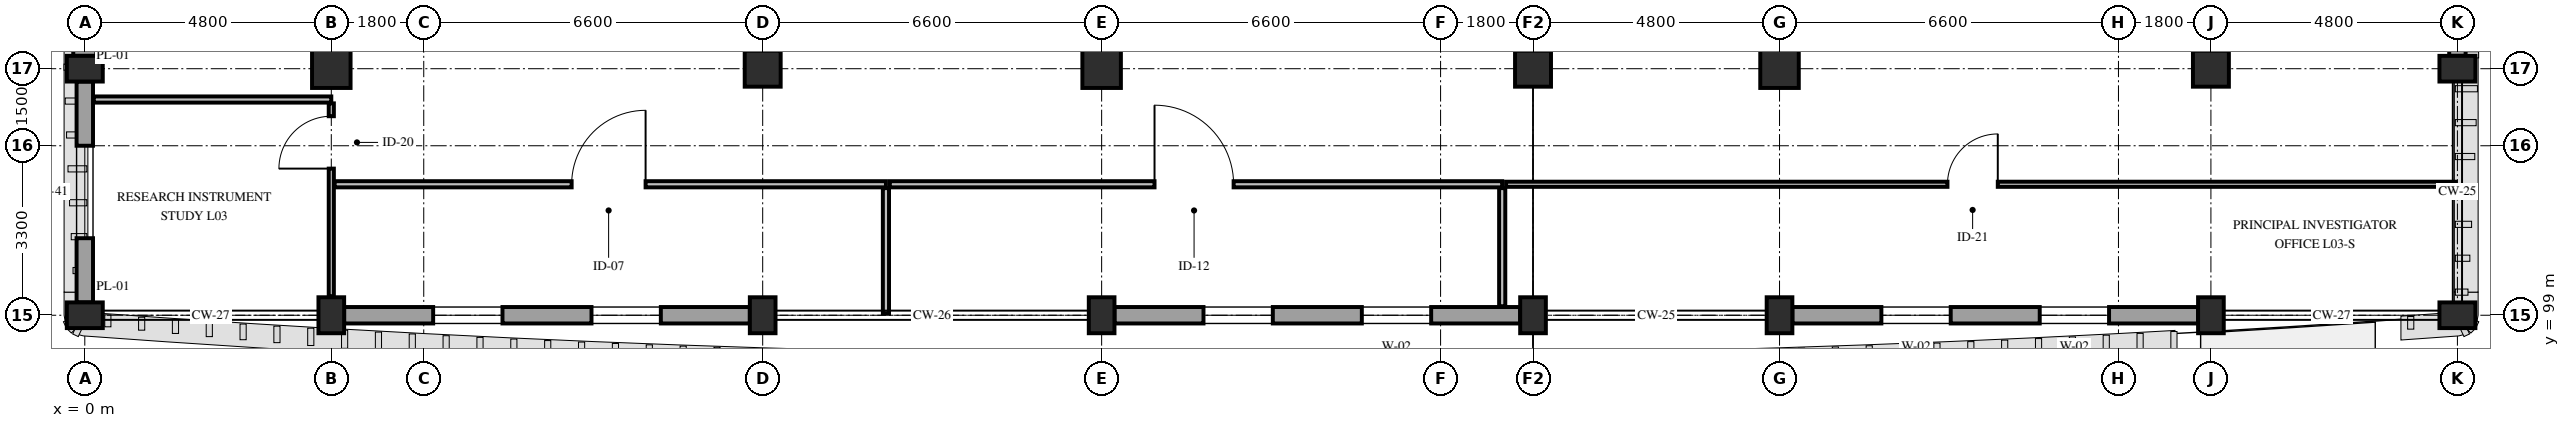
"""IFC4 building model, lengths in metres.
Left out: names, types, materials, properties, quantities, classifications, styles, units other than length and angle.
Written with IfcOpenShell. Run it as: python <this file> out.ifc"""

import sys

from ifc_helpers import new_model, si_unit, direction, frame, frame_2d, origin, origin_2d, place, context, subcontext, project, spatial, rectangle, extrude, element, fill, save


model = new_model("IFC4")
c1 = context("Model", 3, precision=1e-05, world=origin(), true_north=direction((0.0, 1.0)))
c2 = subcontext(c1, "Body", "Model", "MODEL_VIEW")
j1 = project(units=[si_unit("LENGTHUNIT", "METRE"), si_unit("PLANEANGLEUNIT", "RADIAN")], contexts=[c1])
p1 = place(None, origin())
s1 = spatial("IfcSite", under=j1, at=p1, CompositionType="ELEMENT")
p2 = place(p1, origin())
s2 = spatial("IfcBuilding", under=s1, at=p2, CompositionType="ELEMENT")
p3 = place(p2, frame((0.0, 0.0, 15.0)))
s3 = spatial("IfcBuildingStorey", under=s2, at=p3, CompositionType="ELEMENT", Elevation=15.0)
for number, where, z_axis, x_axis in (
    (1, (0.0, 99.0, 0.0), (0.0, 0.0, 1.0), (0.0, 1.0, 0.0)),
    (2, (0.0, 103.8, 0.0), (0.0, 0.0, 1.0), (0.0, 1.0, 0.0)),
    (3, (4.8, 99.0, 0.0), (0.0, 0.0, 1.0), (1.0, 0.0, 0.0)),
):
    element("IfcColumn", number, at=place(p3, frame(where, z_axis=z_axis, x_axis=x_axis)), inside=s3, PredefinedType="PILASTER", context=c2, shape_type="SweptSolid", body=[
        extrude(rectangle(XDim=0.5, YDim=0.7, at=origin_2d()), origin(), (0.0, 0.0, 1.0), 4.8),
    ])
p4 = place(p3, frame((4.8, 103.8, 0.0), z_axis=(0.0, 0.0, 1.0), x_axis=(1.0, 0.0, 0.0)))
e4 = element("IfcColumn", 4, at=p4, inside=s3, PredefinedType="COLUMN", context=c2, shape_type="SweptSolid", body=[
    extrude(rectangle(XDim=0.75, YDim=0.75, at=origin_2d()), origin(), (0.0, 0.0, 1.0), 4.8),
])
p5 = place(p3, frame((13.2, 99.0, 0.0), z_axis=(0.0, 0.0, 1.0), x_axis=(1.0, 0.0, 0.0)))
e5 = element("IfcColumn", 5, at=p5, inside=s3, PredefinedType="PILASTER", context=c2, shape_type="SweptSolid", body=[
    extrude(rectangle(XDim=0.5, YDim=0.7, at=origin_2d()), origin(), (0.0, 0.0, 1.0), 4.8),
])
p6 = place(p3, frame((13.2, 103.8, 0.0), z_axis=(0.0, 0.0, 1.0), x_axis=(1.0, 0.0, 0.0)))
e6 = element("IfcColumn", 6, at=p6, inside=s3, PredefinedType="COLUMN", context=c2, shape_type="SweptSolid", body=[
    extrude(rectangle(XDim=0.7, YDim=0.7, at=origin_2d()), origin(), (0.0, 0.0, 1.0), 4.8),
])
p7 = place(p3, frame((19.8, 99.0, 0.0), z_axis=(0.0, 0.0, 1.0), x_axis=(1.0, 0.0, 0.0)))
e7 = element("IfcColumn", 7, at=p7, inside=s3, PredefinedType="PILASTER", context=c2, shape_type="SweptSolid", body=[
    extrude(rectangle(XDim=0.5, YDim=0.7, at=origin_2d()), origin(), (0.0, 0.0, 1.0), 4.8),
])
p8 = place(p3, frame((19.8, 103.8, 0.0), z_axis=(0.0, 0.0, 1.0), x_axis=(1.0, 0.0, 0.0)))
e8 = element("IfcColumn", 8, at=p8, inside=s3, PredefinedType="COLUMN", context=c2, shape_type="SweptSolid", body=[
    extrude(rectangle(XDim=0.75, YDim=0.75, at=origin_2d()), origin(), (0.0, 0.0, 1.0), 4.8),
])
p9 = place(p3, frame((28.2, 99.0, 0.0), z_axis=(0.0, 0.0, 1.0), x_axis=(1.0, 0.0, 0.0)))
e9 = element("IfcColumn", 9, at=p9, inside=s3, PredefinedType="PILASTER", context=c2, shape_type="SweptSolid", body=[
    extrude(rectangle(XDim=0.5, YDim=0.7, at=origin_2d()), origin(), (0.0, 0.0, 1.0), 4.8),
])
p10 = place(p3, frame((28.2, 103.8, 0.0), z_axis=(0.0, 0.0, 1.0), x_axis=(1.0, 0.0, 0.0)))
e10 = element("IfcColumn", 10, at=p10, inside=s3, PredefinedType="COLUMN", context=c2, shape_type="SweptSolid", body=[
    extrude(rectangle(XDim=0.7, YDim=0.7, at=origin_2d()), origin(), (0.0, 0.0, 1.0), 4.8),
])
p11 = place(p3, frame((33.0, 99.0, 0.0), z_axis=(0.0, 0.0, 1.0), x_axis=(1.0, 0.0, 0.0)))
e11 = element("IfcColumn", 11, at=p11, inside=s3, PredefinedType="PILASTER", context=c2, shape_type="SweptSolid", body=[
    extrude(rectangle(XDim=0.5, YDim=0.7, at=origin_2d()), origin(), (0.0, 0.0, 1.0), 4.8),
])
p12 = place(p3, frame((33.0, 103.8, 0.0), z_axis=(0.0, 0.0, 1.0), x_axis=(1.0, 0.0, 0.0)))
e12 = element("IfcColumn", 12, at=p12, inside=s3, PredefinedType="COLUMN", context=c2, shape_type="SweptSolid", body=[
    extrude(rectangle(XDim=0.75, YDim=0.75, at=origin_2d()), origin(), (0.0, 0.0, 1.0), 4.8),
])
p13 = place(p3, frame((41.4, 99.0, 0.0), z_axis=(0.0, 0.0, 1.0), x_axis=(1.0, 0.0, 0.0)))
e13 = element("IfcColumn", 13, at=p13, inside=s3, PredefinedType="PILASTER", context=c2, shape_type="SweptSolid", body=[
    extrude(rectangle(XDim=0.5, YDim=0.7, at=origin_2d()), origin(), (0.0, 0.0, 1.0), 4.8),
])
p14 = place(p3, frame((41.4, 103.8, 0.0), z_axis=(0.0, 0.0, 1.0), x_axis=(1.0, 0.0, 0.0)))
e14 = element("IfcColumn", 14, at=p14, inside=s3, PredefinedType="COLUMN", context=c2, shape_type="SweptSolid", body=[
    extrude(rectangle(XDim=0.7, YDim=0.7, at=origin_2d()), origin(), (0.0, 0.0, 1.0), 4.8),
])
for number, where, z_axis, x_axis in (
    (15, (46.2, 99.0, 0.0), (0.0, 0.0, 1.0), (0.0, 1.0, 0.0)),
    (16, (46.2, 103.8, 0.0), (0.0, 0.0, 1.0), (0.0, 1.0, 0.0)),
):
    element("IfcColumn", number, at=place(p3, frame(where, z_axis=z_axis, x_axis=x_axis)), inside=s3, PredefinedType="PILASTER", context=c2, shape_type="SweptSolid", body=[
        extrude(rectangle(XDim=0.5, YDim=0.7, at=origin_2d()), origin(), (0.0, 0.0, 1.0), 4.8),
    ])
p15 = place(p3, frame((0.0, 99.25, 0.0), z_axis=(0.0, 0.0, 1.0), x_axis=(0.0, 1.0, 0.0)))
e17 = element("IfcWall", 17, at=p15, inside=s3, PredefinedType="STANDARD", context=c2, shape_type="SweptSolid", body=[
    extrude(rectangle(XDim=4.3, YDim=0.32, at=frame_2d((2.15, 0.0))), origin(), (0.0, 0.0, 1.0), 3.95),
])
p16 = place(p15, frame((1.25, 0.0, 0.85)))
e18 = element("IfcOpeningElement", 18, at=p16, cuts=e17, PredefinedType="OPENING", context=c2, shape_type="SweptSolid", body=[
    extrude(rectangle(XDim=1.8, YDim=2.24, at=frame_2d((0.9, 1.12))), frame((0.0, 0.175, 0.0), z_axis=(0.0, -1.0, 0.0), x_axis=(1.0, 0.0, 0.0)), (0.0, 0.0, 1.0), 0.35),
])
p17 = place(p3, frame((0.0, 104.05, 0.0), z_axis=(0.0, 0.0, 1.0), x_axis=(0.0, 1.0, 0.0)))
e19 = element("IfcWall", 19, at=p17, inside=s3, PredefinedType="SOLIDWALL", context=c2, shape_type="SweptSolid", body=[
    extrude(rectangle(XDim=6.1, YDim=0.45, at=frame_2d((3.05, 0.0))), origin(), (0.0, 0.0, 1.0), 3.95),
])
p18 = place(p3, frame((46.2, 110.15, 0.0), z_axis=(0.0, 0.0, 1.0), x_axis=(0.0, -1.0, 0.0)))
e20 = element("IfcWall", 20, at=p18, inside=s3, PredefinedType="STANDARD", context=c2, shape_type="SweptSolid", body=[
    extrude(rectangle(XDim=6.1, YDim=0.32, at=frame_2d((3.05, 0.0))), origin(), (0.0, 0.0, 1.0), 3.95),
])
p19 = place(p18, frame((1.65, 0.0, 0.85)))
e21 = element("IfcOpeningElement", 21, at=p19, cuts=e20, PredefinedType="OPENING", context=c2, shape_type="SweptSolid", body=[
    extrude(rectangle(XDim=2.8, YDim=2.08, at=frame_2d((1.4, 1.04))), frame((0.0, 0.175, 0.0), z_axis=(0.0, -1.0, 0.0), x_axis=(1.0, 0.0, 0.0)), (0.0, 0.0, 1.0), 0.35),
])
p20 = place(p3, frame((41.15, 99.0, 0.0), z_axis=(0.0, 0.0, 1.0), x_axis=(-1.0, 0.0, 0.0)))
e22 = element("IfcWall", 22, at=p20, inside=s3, PredefinedType="STANDARD", context=c2, shape_type="SweptSolid", body=[
    extrude(rectangle(XDim=7.9, YDim=0.32, at=frame_2d((3.95, 0.0))), origin(), (0.0, 0.0, 1.0), 3.93),
])
p21 = place(p20, frame((1.733, 0.0, 0.85)))
e23 = element("IfcOpeningElement", 23, at=p21, cuts=e22, PredefinedType="OPENING", context=c2, shape_type="SweptSolid", body=[
    extrude(rectangle(XDim=1.35, YDim=1.66, at=frame_2d((0.675, 0.83))), frame((0.0, 0.175, 0.0), z_axis=(0.0, -1.0, 0.0), x_axis=(1.0, 0.0, 0.0)), (0.0, 0.0, 1.0), 0.35),
])
p22 = place(p20, frame((4.817, 0.0, 0.85)))
e24 = element("IfcOpeningElement", 24, at=p22, cuts=e22, PredefinedType="OPENING", context=c2, shape_type="SweptSolid", body=[
    extrude(rectangle(XDim=1.35, YDim=1.66, at=frame_2d((0.675, 0.83))), frame((0.0, 0.175, 0.0), z_axis=(0.0, -1.0, 0.0), x_axis=(1.0, 0.0, 0.0)), (0.0, 0.0, 1.0), 0.35),
])
p23 = place(p3, frame((27.95, 99.0, 0.0), z_axis=(0.0, 0.0, 1.0), x_axis=(-1.0, 0.0, 0.0)))
e25 = element("IfcWall", 25, at=p23, inside=s3, PredefinedType="STANDARD", context=c2, shape_type="SweptSolid", body=[
    extrude(rectangle(XDim=7.9, YDim=0.32, at=frame_2d((3.95, 0.0))), origin(), (0.0, 0.0, 1.0), 3.93),
])
p24 = place(p23, frame((1.733, 0.0, 0.85)))
e26 = element("IfcOpeningElement", 26, at=p24, cuts=e25, PredefinedType="OPENING", context=c2, shape_type="SweptSolid", body=[
    extrude(rectangle(XDim=1.35, YDim=1.66, at=frame_2d((0.675, 0.83))), frame((0.0, 0.175, 0.0), z_axis=(0.0, -1.0, 0.0), x_axis=(1.0, 0.0, 0.0)), (0.0, 0.0, 1.0), 0.35),
])
p25 = place(p23, frame((4.817, 0.0, 0.85)))
e27 = element("IfcOpeningElement", 27, at=p25, cuts=e25, PredefinedType="OPENING", context=c2, shape_type="SweptSolid", body=[
    extrude(rectangle(XDim=1.35, YDim=1.66, at=frame_2d((0.675, 0.83))), frame((0.0, 0.175, 0.0), z_axis=(0.0, -1.0, 0.0), x_axis=(1.0, 0.0, 0.0)), (0.0, 0.0, 1.0), 0.35),
])
p26 = place(p3, frame((12.95, 99.0, 0.0), z_axis=(0.0, 0.0, 1.0), x_axis=(-1.0, 0.0, 0.0)))
e28 = element("IfcWall", 28, at=p26, inside=s3, PredefinedType="STANDARD", context=c2, shape_type="SweptSolid", body=[
    extrude(rectangle(XDim=7.9, YDim=0.32, at=frame_2d((3.95, 0.0))), origin(), (0.0, 0.0, 1.0), 3.93),
])
p27 = place(p26, frame((1.733, 0.0, 0.85)))
e29 = element("IfcOpeningElement", 29, at=p27, cuts=e28, PredefinedType="OPENING", context=c2, shape_type="SweptSolid", body=[
    extrude(rectangle(XDim=1.35, YDim=1.66, at=frame_2d((0.675, 0.83))), frame((0.0, 0.175, 0.0), z_axis=(0.0, -1.0, 0.0), x_axis=(1.0, 0.0, 0.0)), (0.0, 0.0, 1.0), 0.35),
])
p28 = place(p26, frame((4.817, 0.0, 0.85)))
e30 = element("IfcOpeningElement", 30, at=p28, cuts=e28, PredefinedType="OPENING", context=c2, shape_type="SweptSolid", body=[
    extrude(rectangle(XDim=1.35, YDim=1.66, at=frame_2d((0.675, 0.83))), frame((0.0, 0.175, 0.0), z_axis=(0.0, -1.0, 0.0), x_axis=(1.0, 0.0, 0.0)), (0.0, 0.0, 1.0), 0.35),
])
p29 = place(p3, frame((0.175, 103.2, 0.0), z_axis=(0.0, 0.0, 1.0), x_axis=(1.0, 0.0, 0.0)))
e31 = element("IfcWall", 31, at=p29, inside=s3, PredefinedType="PARTITIONING", context=c2, shape_type="SweptSolid", body=[
    extrude(rectangle(XDim=4.625, YDim=0.12, at=frame_2d((2.312, 0.0))), origin(), (0.0, 0.0, 1.0), 4.08),
])
p30 = place(p3, frame((4.8, 99.37, 0.0), z_axis=(0.0, 0.0, 1.0), x_axis=(0.0, 1.0, 0.0)))
e32 = element("IfcWall", 32, at=p30, inside=s3, PredefinedType="PARTITIONING", context=c2, shape_type="SweptSolid", body=[
    extrude(rectangle(XDim=3.755, YDim=0.1, at=frame_2d((1.877, 0.0))), origin(), (0.0, 0.0, 1.0), 4.13),
])
p31 = place(p30, frame((2.485, 0.0, 0.0)))
e33 = element("IfcOpeningElement", 33, at=p31, cuts=e32, PredefinedType="OPENING", context=c2, shape_type="SweptSolid", body=[
    extrude(rectangle(XDim=1.02, YDim=2.2, at=frame_2d((0.51, 1.1))), frame((0.0, 0.065, 0.0), z_axis=(0.0, -1.0, 0.0), x_axis=(1.0, 0.0, 0.0)), (0.0, 0.0, 1.0), 0.13),
])
p32 = place(p3, frame((4.865, 101.55, 0.0), z_axis=(0.0, 0.0, 1.0), x_axis=(1.0, 0.0, 0.0)))
e34 = element("IfcWall", 34, at=p32, inside=s3, PredefinedType="PARTITIONING", context=c2, shape_type="SweptSolid", body=[
    extrude(rectangle(XDim=10.735, YDim=0.12, at=frame_2d((5.368, 0.0))), origin(), (0.0, 0.0, 1.0), 4.13),
])
p33 = place(p32, frame((4.615, 0.0, 0.0)))
e35 = element("IfcOpeningElement", 35, at=p33, cuts=e34, PredefinedType="OPENING", context=c2, shape_type="SweptSolid", body=[
    extrude(rectangle(XDim=1.44, YDim=2.25, at=frame_2d((0.72, 1.125))), frame((0.0, 0.075, 0.0), z_axis=(0.0, -1.0, 0.0), x_axis=(1.0, 0.0, 0.0)), (0.0, 0.0, 1.0), 0.15),
])
p34 = place(p3, frame((15.6, 99.04, 0.0), z_axis=(0.0, 0.0, 1.0), x_axis=(0.0, 1.0, 0.0)))
e36 = element("IfcWall", 36, at=p34, inside=s3, PredefinedType="PARTITIONING", context=c2, shape_type="SweptSolid", body=[
    extrude(rectangle(XDim=2.435, YDim=0.12, at=frame_2d((1.218, 0.0))), origin(), (0.0, 0.0, 1.0), 3.93),
])
p35 = place(p3, frame((15.675, 101.55, 0.0), z_axis=(0.0, 0.0, 1.0), x_axis=(1.0, 0.0, 0.0)))
e37 = element("IfcWall", 37, at=p35, inside=s3, PredefinedType="PARTITIONING", context=c2, shape_type="SweptSolid", body=[
    extrude(rectangle(XDim=11.925, YDim=0.12, at=frame_2d((5.962, 0.0))), origin(), (0.0, 0.0, 1.0), 4.13),
])
p36 = place(p35, frame((5.155, 0.0, 0.0)))
e38 = element("IfcOpeningElement", 38, at=p36, cuts=e37, PredefinedType="OPENING", context=c2, shape_type="SweptSolid", body=[
    extrude(rectangle(XDim=1.54, YDim=2.25, at=frame_2d((0.77, 1.125))), frame((0.0, 0.075, 0.0), z_axis=(0.0, -1.0, 0.0), x_axis=(1.0, 0.0, 0.0)), (0.0, 0.0, 1.0), 0.15),
])
p37 = place(p3, frame((27.6, 99.175, 0.0), z_axis=(0.0, 0.0, 1.0), x_axis=(0.0, 1.0, 0.0)))
e39 = element("IfcWall", 39, at=p37, inside=s3, PredefinedType="PARTITIONING", context=c2, shape_type="SweptSolid", body=[
    extrude(rectangle(XDim=2.3, YDim=0.12, at=frame_2d((1.15, 0.0))), origin(), (0.0, 0.0, 1.0), 3.93),
])
p38 = place(p3, frame((27.675, 101.55, 0.0), z_axis=(0.0, 0.0, 1.0), x_axis=(1.0, 0.0, 0.0)))
e40 = element("IfcWall", 40, at=p38, inside=s3, PredefinedType="PARTITIONING", context=c2, shape_type="SweptSolid", body=[
    extrude(rectangle(XDim=18.485, YDim=0.1, at=frame_2d((9.242, 0.0))), origin(), (0.0, 0.0, 1.0), 4.08),
])
p39 = place(p38, frame((8.595, 0.0, 0.0)))
e41 = element("IfcOpeningElement", 41, at=p39, cuts=e40, PredefinedType="OPENING", context=c2, shape_type="SweptSolid", body=[
    extrude(rectangle(XDim=0.98, YDim=2.2, at=frame_2d((0.49, 1.1))), frame((0.0, 0.065, 0.0), z_axis=(0.0, -1.0, 0.0), x_axis=(1.0, 0.0, 0.0)), (0.0, 0.0, 1.0), 0.13),
])
p40 = place(p16, origin())
e42 = element("IfcWindow", 42, at=p40, inside=s3, PartitioningType="DOUBLE_PANEL_VERTICAL", PredefinedType="WINDOW", context=c2, shape_type="SweptSolid", body=[
    extrude(rectangle(XDim=1.8, YDim=2.24, at=frame_2d((0.9, 1.12))), frame((0.0, 0.03, 0.0), z_axis=(0.0, -1.0, 0.0), x_axis=(1.0, 0.0, 0.0)), (0.0, 0.0, 1.0), 0.06),
])
fill(e18, e42)
p41 = place(p21, origin())
e43 = element("IfcWindow", 43, at=p41, inside=s3, PartitioningType="SINGLE_PANEL", PredefinedType="WINDOW", context=c2, shape_type="SweptSolid", body=[
    extrude(rectangle(XDim=1.35, YDim=1.66, at=frame_2d((0.675, 0.83))), frame((0.0, 0.03, 0.0), z_axis=(0.0, -1.0, 0.0), x_axis=(1.0, 0.0, 0.0)), (0.0, 0.0, 1.0), 0.06),
])
fill(e23, e43)
p42 = place(p22, origin())
e44 = element("IfcWindow", 44, at=p42, inside=s3, PartitioningType="SINGLE_PANEL", PredefinedType="WINDOW", context=c2, shape_type="SweptSolid", body=[
    extrude(rectangle(XDim=1.35, YDim=1.66, at=frame_2d((0.675, 0.83))), frame((0.0, 0.03, 0.0), z_axis=(0.0, -1.0, 0.0), x_axis=(1.0, 0.0, 0.0)), (0.0, 0.0, 1.0), 0.06),
])
fill(e24, e44)
p43 = place(p24, origin())
e45 = element("IfcWindow", 45, at=p43, inside=s3, PartitioningType="SINGLE_PANEL", PredefinedType="WINDOW", context=c2, shape_type="SweptSolid", body=[
    extrude(rectangle(XDim=1.35, YDim=1.66, at=frame_2d((0.675, 0.83))), frame((0.0, 0.03, 0.0), z_axis=(0.0, -1.0, 0.0), x_axis=(1.0, 0.0, 0.0)), (0.0, 0.0, 1.0), 0.06),
])
fill(e26, e45)
p44 = place(p25, origin())
e46 = element("IfcWindow", 46, at=p44, inside=s3, PartitioningType="SINGLE_PANEL", PredefinedType="WINDOW", context=c2, shape_type="SweptSolid", body=[
    extrude(rectangle(XDim=1.35, YDim=1.66, at=frame_2d((0.675, 0.83))), frame((0.0, 0.03, 0.0), z_axis=(0.0, -1.0, 0.0), x_axis=(1.0, 0.0, 0.0)), (0.0, 0.0, 1.0), 0.06),
])
fill(e27, e46)
p45 = place(p27, origin())
e47 = element("IfcWindow", 47, at=p45, inside=s3, PartitioningType="SINGLE_PANEL", PredefinedType="WINDOW", context=c2, shape_type="SweptSolid", body=[
    extrude(rectangle(XDim=1.35, YDim=1.66, at=frame_2d((0.675, 0.83))), frame((0.0, 0.03, 0.0), z_axis=(0.0, -1.0, 0.0), x_axis=(1.0, 0.0, 0.0)), (0.0, 0.0, 1.0), 0.06),
])
fill(e29, e47)
p46 = place(p28, origin())
e48 = element("IfcWindow", 48, at=p46, inside=s3, PartitioningType="SINGLE_PANEL", PredefinedType="WINDOW", context=c2, shape_type="SweptSolid", body=[
    extrude(rectangle(XDim=1.35, YDim=1.66, at=frame_2d((0.675, 0.83))), frame((0.0, 0.03, 0.0), z_axis=(0.0, -1.0, 0.0), x_axis=(1.0, 0.0, 0.0)), (0.0, 0.0, 1.0), 0.06),
])
fill(e30, e48)
p47 = place(p31, origin())
e49 = element("IfcDoor", 49, at=p47, inside=s3, OperationType="SINGLE_SWING_LEFT", PredefinedType="DOOR", context=c2, shape_type="SweptSolid", body=[
    extrude(rectangle(XDim=1.02, YDim=2.2, at=frame_2d((0.51, 1.1))), frame((0.0, 0.025, 0.0), z_axis=(0.0, -1.0, 0.0), x_axis=(1.0, 0.0, 0.0)), (0.0, 0.0, 1.0), 0.05),
])
fill(e33, e49)
p48 = place(p33, origin())
e50 = element("IfcDoor", 50, at=p48, inside=s3, OperationType="SINGLE_SWING_RIGHT", PredefinedType="DOOR", context=c2, shape_type="SweptSolid", body=[
    extrude(rectangle(XDim=1.44, YDim=2.25, at=frame_2d((0.72, 1.125))), frame((0.0, 0.025, 0.0), z_axis=(0.0, -1.0, 0.0), x_axis=(1.0, 0.0, 0.0)), (0.0, 0.0, 1.0), 0.05),
])
fill(e35, e50)
p49 = place(p36, origin())
e51 = element("IfcDoor", 51, at=p49, inside=s3, OperationType="SINGLE_SWING_LEFT", PredefinedType="DOOR", context=c2, shape_type="SweptSolid", body=[
    extrude(rectangle(XDim=1.54, YDim=2.25, at=frame_2d((0.77, 1.125))), frame((0.0, 0.025, 0.0), z_axis=(0.0, -1.0, 0.0), x_axis=(1.0, 0.0, 0.0)), (0.0, 0.0, 1.0), 0.05),
])
fill(e38, e51)
p50 = place(p39, origin())
e52 = element("IfcDoor", 52, at=p50, inside=s3, OperationType="SINGLE_SWING_RIGHT", PredefinedType="DOOR", context=c2, shape_type="SweptSolid", body=[
    extrude(rectangle(XDim=0.98, YDim=2.2, at=frame_2d((0.49, 1.1))), frame((0.0, 0.025, 0.0), z_axis=(0.0, -1.0, 0.0), x_axis=(1.0, 0.0, 0.0)), (0.0, 0.0, 1.0), 0.05),
])
fill(e41, e52)
save(model, sys.argv[1])
